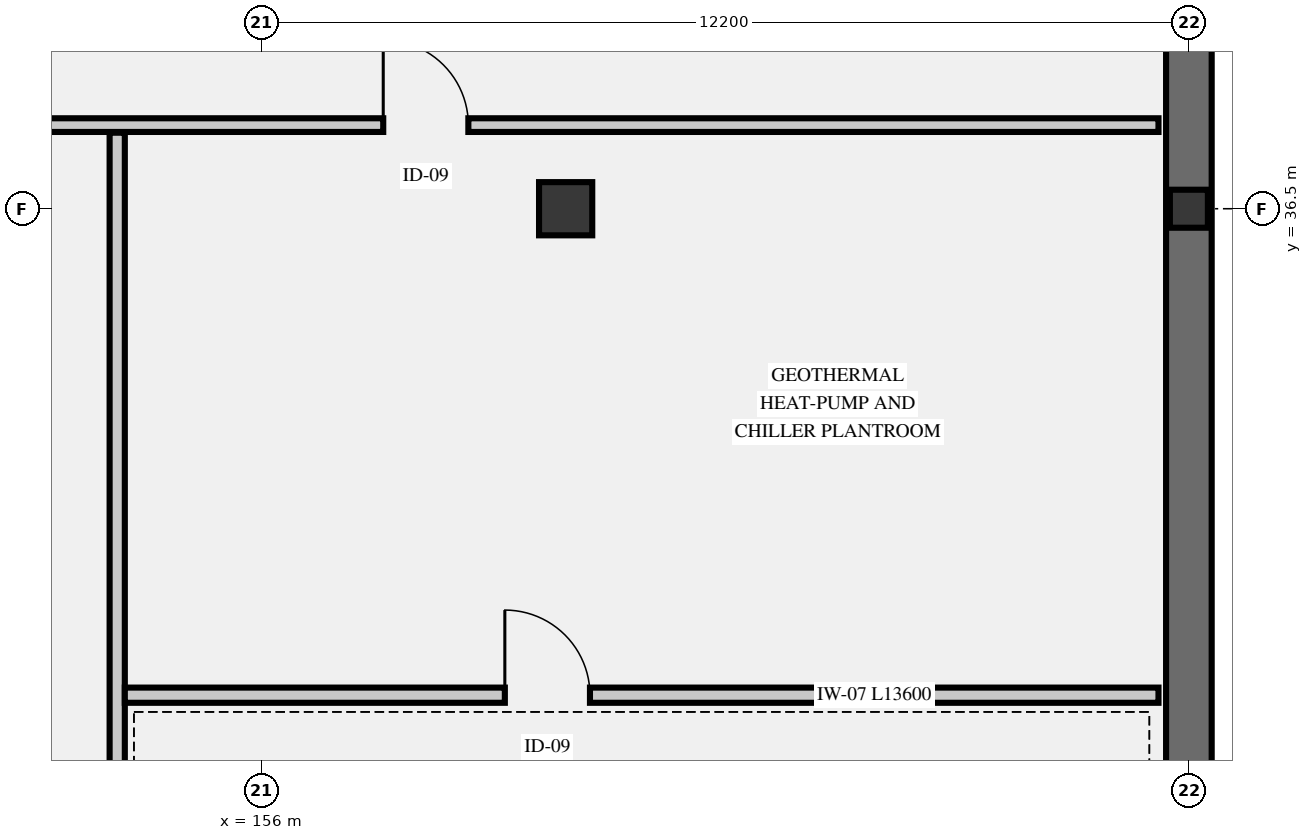
"""IFC4 building model, lengths in metres.
Left out: names, types, materials, properties, quantities, classifications, styles, units other than length and angle.
Written with IfcOpenShell. Run it as: python <this file> out.ifc"""

import sys

from ifc_helpers import new_model, si_unit, direction, frame, frame_2d, origin, origin_2d, place, context, subcontext, project, spatial, rectangle, extrude, element, fill, save


model = new_model("IFC4")
c1 = context("Model", 3, precision=1e-05, world=origin(), true_north=direction((0.0, 1.0)))
c2 = subcontext(c1, "Body", "Model", "MODEL_VIEW")
j1 = project(units=[si_unit("LENGTHUNIT", "METRE"), si_unit("PLANEANGLEUNIT", "RADIAN")], contexts=[c1])
p1 = place(None, origin())
s1 = spatial("IfcSite", under=j1, at=p1, CompositionType="ELEMENT")
p2 = place(p1, origin())
s2 = spatial("IfcBuilding", under=s1, at=p2, CompositionType="ELEMENT")
p3 = place(p2, frame((0.0, 0.0, -8.4)))
s3 = spatial("IfcBuildingStorey", under=s2, at=p3, CompositionType="ELEMENT", Elevation=-8.4)
p4 = place(p3, frame((168.2, 5.1, 0.0), z_axis=(0.0, 0.0, 1.0), x_axis=(0.0, 1.0, 0.0)))
e1 = element("IfcWall", 1, at=p4, inside=s3, PredefinedType="USERDEFINED", context=c2, shape_type="SweptSolid", body=[
    extrude(rectangle(XDim=38.1, YDim=0.6, at=frame_2d((19.05, 0.0))), origin(), (0.0, 0.0, 1.0), 3.92),
])
p5 = place(p3, frame((160.0, 36.5, -0.44), z_axis=(0.0, 0.0, 1.0), x_axis=(1.0, 0.0, 0.0)))
e2 = element("IfcColumn", 2, at=p5, inside=s3, PredefinedType="COLUMN", context=c2, shape_type="SweptSolid", body=[
    extrude(rectangle(XDim=0.7, YDim=0.7, at=origin_2d()), origin(), (0.0, 0.0, 1.0), 4.64),
])
p6 = place(p3, frame((168.2, 36.5, -0.44), z_axis=(0.0, 0.0, 1.0), x_axis=(1.0, 0.0, 0.0)))
e3 = element("IfcColumn", 3, at=p6, inside=s3, PredefinedType="COLUMN", context=c2, shape_type="SweptSolid", body=[
    extrude(rectangle(XDim=0.5, YDim=0.5, at=origin_2d()), origin(), (0.0, 0.0, 1.0), 4.64),
])
p7 = place(p3, frame((113.6, 37.6, 0.0), z_axis=(0.0, 0.0, 1.0), x_axis=(1.0, 0.0, 0.0)))
e4 = element("IfcWall", 4, at=p7, inside=s3, PredefinedType="PARTITIONING", context=c2, shape_type="SweptSolid", body=[
    extrude(rectangle(XDim=54.2, YDim=0.18, at=frame_2d((27.1, 0.0))), origin(), (0.0, 0.0, 1.0), 3.108),
])
p8 = place(p7, frame((10.5, 0.0, 0.0)))
e5 = element("IfcOpeningElement", 5, at=p8, cuts=e4, PredefinedType="OPENING", context=c2, shape_type="SweptSolid", body=[
    extrude(rectangle(XDim=1.08, YDim=2.22, at=frame_2d((0.54, 1.11))), frame((0.0, 0.1, 0.0), z_axis=(0.0, -1.0, 0.0), x_axis=(1.0, 0.0, 0.0)), (0.0, 0.0, 1.0), 0.2),
])
p9 = place(p7, frame((44.0, 0.0, 0.0)))
e6 = element("IfcOpeningElement", 6, at=p9, cuts=e4, PredefinedType="OPENING", context=c2, shape_type="SweptSolid", body=[
    extrude(rectangle(XDim=1.12, YDim=2.2, at=frame_2d((0.56, 1.1))), frame((0.0, 0.1, 0.0), z_axis=(0.0, -1.0, 0.0), x_axis=(1.0, 0.0, 0.0)), (0.0, 0.0, 1.0), 0.2),
])
p10 = place(p7, frame((1.8, 0.0, 0.0)))
e7 = element("IfcOpeningElement", 7, at=p10, cuts=e4, PredefinedType="OPENING", context=c2, shape_type="SweptSolid", body=[
    extrude(rectangle(XDim=0.88, YDim=2.1, at=frame_2d((0.44, 1.05))), frame((0.0, 0.1, 0.0), z_axis=(0.0, -1.0, 0.0), x_axis=(1.0, 0.0, 0.0)), (0.0, 0.0, 1.0), 0.2),
])
p11 = place(p7, frame((5.8, 0.0, 0.0)))
e8 = element("IfcOpeningElement", 8, at=p11, cuts=e4, PredefinedType="OPENING", context=c2, shape_type="SweptSolid", body=[
    extrude(rectangle(XDim=0.9, YDim=2.1, at=frame_2d((0.45, 1.05))), frame((0.0, 0.1, 0.0), z_axis=(0.0, -1.0, 0.0), x_axis=(1.0, 0.0, 0.0)), (0.0, 0.0, 1.0), 0.2),
])
p12 = place(p3, frame((154.1, 16.5, 0.0), z_axis=(0.0, 0.0, 1.0), x_axis=(0.0, 1.0, 0.0)))
e9 = element("IfcWall", 9, at=p12, inside=s3, PredefinedType="PARTITIONING", context=c2, shape_type="SweptSolid", body=[
    extrude(rectangle(XDim=21.0, YDim=0.2, at=frame_2d((10.5, 0.0))), origin(), (0.0, 0.0, 1.0), 3.208),
])
p13 = place(p3, frame((154.2, 30.1, 0.0), z_axis=(0.0, 0.0, 1.0), x_axis=(1.0, 0.0, 0.0)))
e10 = element("IfcWall", 10, at=p13, inside=s3, PredefinedType="PARTITIONING", context=c2, shape_type="SweptSolid", body=[
    extrude(rectangle(XDim=13.6, YDim=0.2, at=frame_2d((6.8, 0.0))), origin(), (0.0, 0.0, 1.0), 3.108),
])
p14 = place(p13, frame((5.0, 0.0, 0.0)))
e11 = element("IfcOpeningElement", 11, at=p14, cuts=e10, PredefinedType="OPENING", context=c2, shape_type="SweptSolid", body=[
    extrude(rectangle(XDim=1.12, YDim=2.2, at=frame_2d((0.56, 1.1))), frame((0.0, 0.11, 0.0), z_axis=(0.0, -1.0, 0.0), x_axis=(1.0, 0.0, 0.0)), (0.0, 0.0, 1.0), 0.22),
])
p15 = place(p9, origin())
e12 = element("IfcDoor", 12, at=p15, inside=s3, OperationType="SINGLE_SWING_LEFT", PredefinedType="DOOR", context=c2, shape_type="SweptSolid", body=[
    extrude(rectangle(XDim=1.12, YDim=2.2, at=frame_2d((0.56, 1.1))), frame((0.0, 0.025, 0.0), z_axis=(0.0, -1.0, 0.0), x_axis=(1.0, 0.0, 0.0)), (0.0, 0.0, 1.0), 0.05),
])
fill(e6, e12)
p16 = place(p14, origin())
e13 = element("IfcDoor", 13, at=p16, inside=s3, OperationType="SINGLE_SWING_LEFT", PredefinedType="DOOR", context=c2, shape_type="SweptSolid", body=[
    extrude(rectangle(XDim=1.12, YDim=2.2, at=frame_2d((0.56, 1.1))), frame((0.0, 0.025, 0.0), z_axis=(0.0, -1.0, 0.0), x_axis=(1.0, 0.0, 0.0)), (0.0, 0.0, 1.0), 0.05),
])
fill(e11, e13)
save(model, sys.argv[1])
